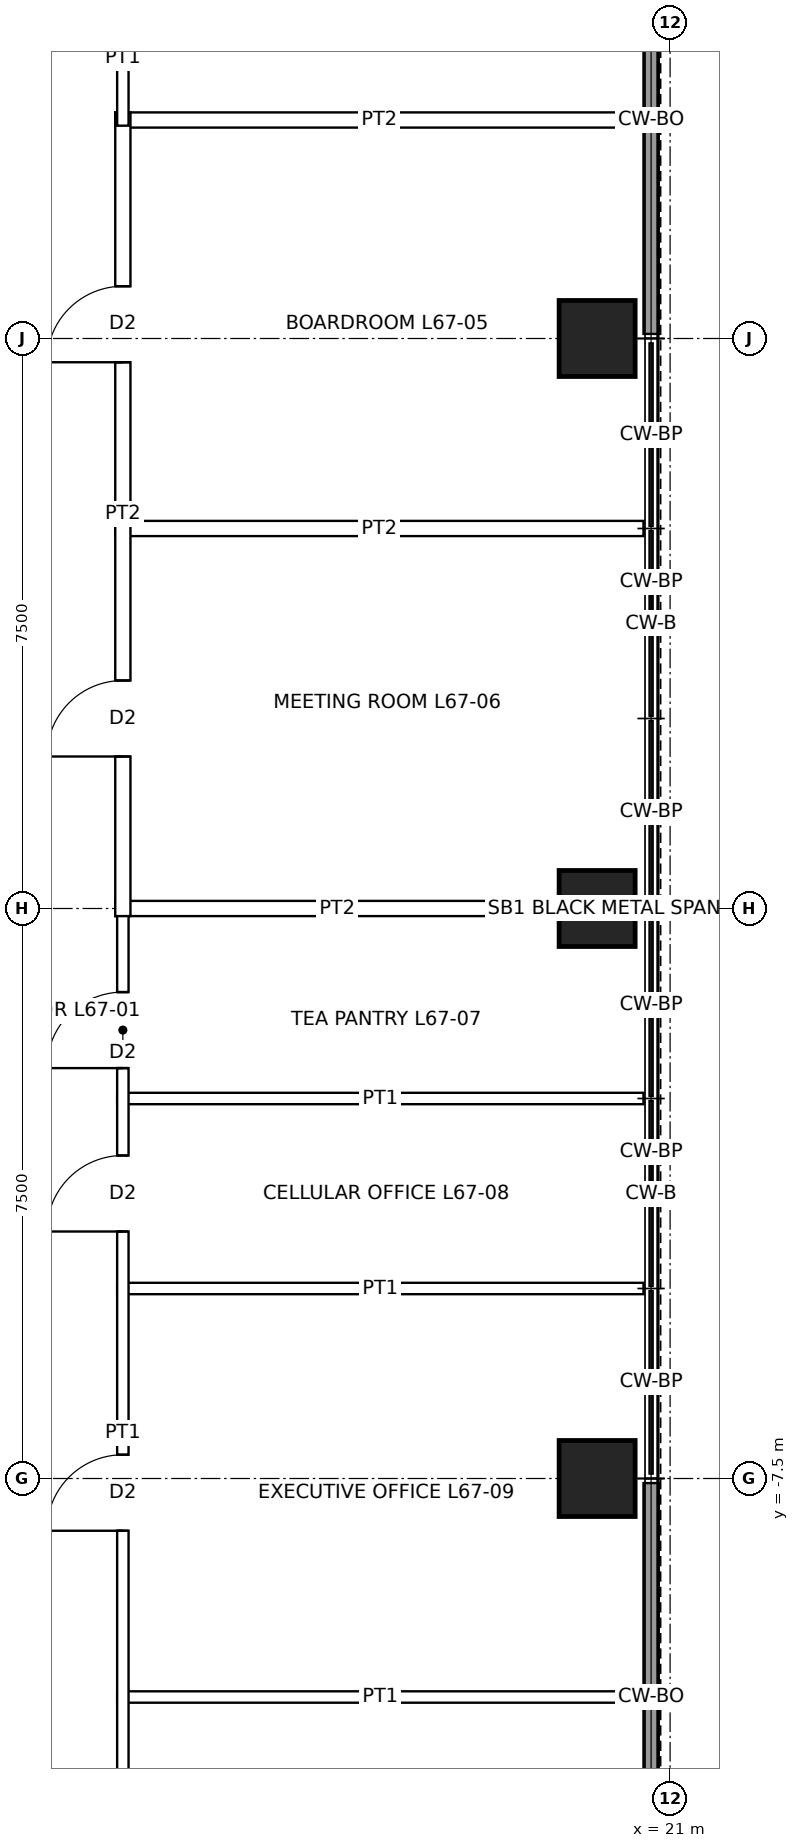
"""IFC4 building model, lengths in metres.
Left out: names, types, materials, properties, quantities, classifications, styles, units other than length and angle.
Written with IfcOpenShell. Run it as: python <this file> out.ifc"""

import sys

from ifc_helpers import new_model, si_unit, direction, frame, frame_2d, origin, origin_2d, place, context, subcontext, project, spatial, rectangle, hollow_rectangle, extrude, element, fill, save


model = new_model("IFC4")
c1 = context("Model", 3, precision=1e-05, world=origin(), true_north=direction((0.0, 1.0)))
c2 = subcontext(c1, "Body", "Model", "MODEL_VIEW")
j1 = project(units=[si_unit("LENGTHUNIT", "METRE"), si_unit("PLANEANGLEUNIT", "RADIAN")], contexts=[c1])
p1 = place(None, origin())
s1 = spatial("IfcSite", under=j1, at=p1, CompositionType="ELEMENT")
p2 = place(p1, origin())
s2 = spatial("IfcBuilding", under=s1, at=p2, CompositionType="ELEMENT")
p3 = place(p2, frame((0.0, 0.0, 303.9)))
s3 = spatial("IfcBuildingStorey", under=s2, at=p3, CompositionType="ELEMENT", Elevation=303.9)
for number, where, z_axis, x_axis in (
    (1, (20.04, 7.5, 0.0), (0.0, 0.0, 1.0), (1.0, 0.0, 0.0)),
    (2, (20.04, 0.0, 0.0), (0.0, 0.0, 1.0), (1.0, 0.0, 0.0)),
    (3, (20.04, -7.5, 0.0), (0.0, 0.0, 1.0), (1.0, 0.0, 0.0)),
):
    element("IfcColumn", number, at=place(p3, frame(where, z_axis=z_axis, x_axis=x_axis)), inside=s3, PredefinedType="COLUMN", context=c2, shape_type="SweptSolid", body=[
        extrude(hollow_rectangle(XDim=1.0, YDim=1.0, WallThickness=0.075, at=origin_2d()), origin(), (0.0, 0.0, 1.0), 4.0),
    ])
for number, where, z_axis, x_axis in (
    (4, (20.75, 13.19, 0.0), (0.0, 0.0, 1.0), (0.0, -1.0, 0.0)),
    (5, (20.75, 10.345, 0.0), (0.0, 0.0, 1.0), (0.0, -1.0, 0.0)),
    (6, (20.75, -7.56, 0.0), (0.0, 0.0, 1.0), (0.0, -1.0, 0.0)),
    (7, (20.75, -10.405, 0.0), (0.0, 0.0, 1.0), (0.0, -1.0, 0.0)),
):
    element("IfcWall", number, at=place(p3, frame(where, z_axis=z_axis, x_axis=x_axis)), inside=s3, PredefinedType="SOLIDWALL", context=c2, shape_type="SweptSolid", body=[
        extrude(rectangle(XDim=2.785, YDim=0.2, at=frame_2d((1.393, 0.0))), origin(), (0.0, 0.0, 1.0), 3.85),
    ])
for number, where, z_axis, x_axis in (
    (8, (13.725, -10.375, 0.0), (0.0, 0.0, 1.0), (1.0, 0.0, 0.0)),
    (9, (13.725, -5.0, 0.0), (0.0, 0.0, 1.0), (1.0, 0.0, 0.0)),
    (10, (13.725, -2.5, 0.0), (0.0, 0.0, 1.0), (1.0, 0.0, 0.0)),
):
    element("IfcWall", number, at=place(p3, frame(where, z_axis=z_axis, x_axis=x_axis)), inside=s3, PredefinedType="PARTITIONING", context=c2, shape_type="SweptSolid", body=[
        extrude(rectangle(XDim=6.925, YDim=0.15, at=frame_2d((3.462, 0.0))), origin(), (0.0, 0.0, 1.0), 3.85),
    ])
p4 = place(p3, frame((13.7, 0.0, 0.0), z_axis=(0.0, 0.0, 1.0), x_axis=(1.0, 0.0, 0.0)))
e11 = element("IfcWall", 11, at=p4, inside=s3, PredefinedType="PARTITIONING", context=c2, shape_type="SweptSolid", body=[
    extrude(rectangle(XDim=5.84, YDim=0.2, at=frame_2d((2.92, 0.0))), origin(), (0.0, 0.0, 1.0), 3.243),
])
for number, where, z_axis, x_axis in (
    (12, (13.7, 5.0, 0.0), (0.0, 0.0, 1.0), (1.0, 0.0, 0.0)),
    (13, (13.7, 10.375, 0.0), (0.0, 0.0, 1.0), (1.0, 0.0, 0.0)),
):
    element("IfcWall", number, at=place(p3, frame(where, z_axis=z_axis, x_axis=x_axis)), inside=s3, PredefinedType="PARTITIONING", context=c2, shape_type="SweptSolid", body=[
        extrude(rectangle(XDim=6.95, YDim=0.2, at=frame_2d((3.475, 0.0))), origin(), (0.0, 0.0, 1.0), 3.85),
    ])
p5 = place(p3, frame((13.8, -13.875, 0.0), z_axis=(0.0, 0.0, 1.0), x_axis=(0.0, 1.0, 0.0)))
e14 = element("IfcWall", 14, at=p5, inside=s3, PredefinedType="PARTITIONING", context=c2, shape_type="SweptSolid", body=[
    extrude(rectangle(XDim=13.95, YDim=0.15, at=frame_2d((6.975, 0.0))), origin(), (0.0, 0.0, 1.0), 3.85),
])
p6 = place(p5, frame((11.775, 0.0, 0.0)))
e15 = element("IfcOpeningElement", 15, at=p6, cuts=e14, PredefinedType="OPENING", context=c2, shape_type="SweptSolid", body=[
    extrude(rectangle(XDim=1.0, YDim=2.1, at=frame_2d((0.5, 1.05))), frame((0.0, 0.085, 0.0), z_axis=(0.0, -1.0, 0.0), x_axis=(1.0, 0.0, 0.0)), (0.0, 0.0, 1.0), 0.17),
])
p7 = place(p5, frame((9.625, 0.0, 0.0)))
e16 = element("IfcOpeningElement", 16, at=p7, cuts=e14, PredefinedType="OPENING", context=c2, shape_type="SweptSolid", body=[
    extrude(rectangle(XDim=1.0, YDim=2.1, at=frame_2d((0.5, 1.05))), frame((0.0, 0.085, 0.0), z_axis=(0.0, -1.0, 0.0), x_axis=(1.0, 0.0, 0.0)), (0.0, 0.0, 1.0), 0.17),
])
p8 = place(p5, frame((5.688, 0.0, 0.0)))
e17 = element("IfcOpeningElement", 17, at=p8, cuts=e14, PredefinedType="OPENING", context=c2, shape_type="SweptSolid", body=[
    extrude(rectangle(XDim=1.0, YDim=2.1, at=frame_2d((0.5, 1.05))), frame((0.0, 0.085, 0.0), z_axis=(0.0, -1.0, 0.0), x_axis=(1.0, 0.0, 0.0)), (0.0, 0.0, 1.0), 0.17),
])
p9 = place(p3, frame((13.8, -0.1, 0.0), z_axis=(0.0, 0.0, 1.0), x_axis=(0.0, 1.0, 0.0)))
e18 = element("IfcWall", 18, at=p9, inside=s3, PredefinedType="PARTITIONING", context=c2, shape_type="SweptSolid", body=[
    extrude(rectangle(XDim=10.575, YDim=0.2, at=frame_2d((5.288, 0.0))), origin(), (0.0, 0.0, 1.0), 3.85),
])
p10 = place(p9, frame((7.288, 0.0, 0.0)))
e19 = element("IfcOpeningElement", 19, at=p10, cuts=e18, PredefinedType="OPENING", context=c2, shape_type="SweptSolid", body=[
    extrude(rectangle(XDim=1.0, YDim=2.1, at=frame_2d((0.5, 1.05))), frame((0.0, 0.11, 0.0), z_axis=(0.0, -1.0, 0.0), x_axis=(1.0, 0.0, 0.0)), (0.0, 0.0, 1.0), 0.22),
])
p11 = place(p9, frame((2.1, 0.0, 0.0)))
e20 = element("IfcOpeningElement", 20, at=p11, cuts=e18, PredefinedType="OPENING", context=c2, shape_type="SweptSolid", body=[
    extrude(rectangle(XDim=1.0, YDim=2.1, at=frame_2d((0.5, 1.05))), frame((0.0, 0.11, 0.0), z_axis=(0.0, -1.0, 0.0), x_axis=(1.0, 0.0, 0.0)), (0.0, 0.0, 1.0), 0.22),
])
p12 = place(p3, frame((13.8, 10.3, 0.0), z_axis=(0.0, 0.0, 1.0), x_axis=(0.0, 1.0, 0.0)))
e21 = element("IfcWall", 21, at=p12, inside=s3, PredefinedType="PARTITIONING", context=c2, shape_type="SweptSolid", body=[
    extrude(rectangle(XDim=1.775, YDim=0.15, at=frame_2d((0.887, 0.0))), origin(), (0.0, 0.0, 1.0), 3.85),
])
p13 = place(p10, origin())
e22 = element("IfcDoor", 22, at=p13, inside=s3, OperationType="SINGLE_SWING_LEFT", PredefinedType="DOOR", context=c2, shape_type="SweptSolid", body=[
    extrude(rectangle(XDim=1.0, YDim=2.1, at=frame_2d((0.5, 1.05))), frame((0.0, 0.025, 0.0), z_axis=(0.0, -1.0, 0.0), x_axis=(1.0, 0.0, 0.0)), (0.0, 0.0, 1.0), 0.05),
])
fill(e19, e22)
p14 = place(p11, origin())
e23 = element("IfcDoor", 23, at=p14, inside=s3, OperationType="SINGLE_SWING_LEFT", PredefinedType="DOOR", context=c2, shape_type="SweptSolid", body=[
    extrude(rectangle(XDim=1.0, YDim=2.1, at=frame_2d((0.5, 1.05))), frame((0.0, 0.025, 0.0), z_axis=(0.0, -1.0, 0.0), x_axis=(1.0, 0.0, 0.0)), (0.0, 0.0, 1.0), 0.05),
])
fill(e20, e23)
p15 = place(p6, origin())
e24 = element("IfcDoor", 24, at=p15, inside=s3, OperationType="SINGLE_SWING_LEFT", PredefinedType="DOOR", context=c2, shape_type="SweptSolid", body=[
    extrude(rectangle(XDim=1.0, YDim=2.1, at=frame_2d((0.5, 1.05))), frame((0.0, 0.025, 0.0), z_axis=(0.0, -1.0, 0.0), x_axis=(1.0, 0.0, 0.0)), (0.0, 0.0, 1.0), 0.05),
])
fill(e15, e24)
p16 = place(p7, origin())
e25 = element("IfcDoor", 25, at=p16, inside=s3, OperationType="SINGLE_SWING_LEFT", PredefinedType="DOOR", context=c2, shape_type="SweptSolid", body=[
    extrude(rectangle(XDim=1.0, YDim=2.1, at=frame_2d((0.5, 1.05))), frame((0.0, 0.025, 0.0), z_axis=(0.0, -1.0, 0.0), x_axis=(1.0, 0.0, 0.0)), (0.0, 0.0, 1.0), 0.05),
])
fill(e16, e25)
p17 = place(p8, origin())
e26 = element("IfcDoor", 26, at=p17, inside=s3, OperationType="SINGLE_SWING_LEFT", PredefinedType="DOOR", context=c2, shape_type="SweptSolid", body=[
    extrude(rectangle(XDim=1.0, YDim=2.1, at=frame_2d((0.5, 1.05))), frame((0.0, 0.025, 0.0), z_axis=(0.0, -1.0, 0.0), x_axis=(1.0, 0.0, 0.0)), (0.0, 0.0, 1.0), 0.05),
])
fill(e17, e26)
save(model, sys.argv[1])
